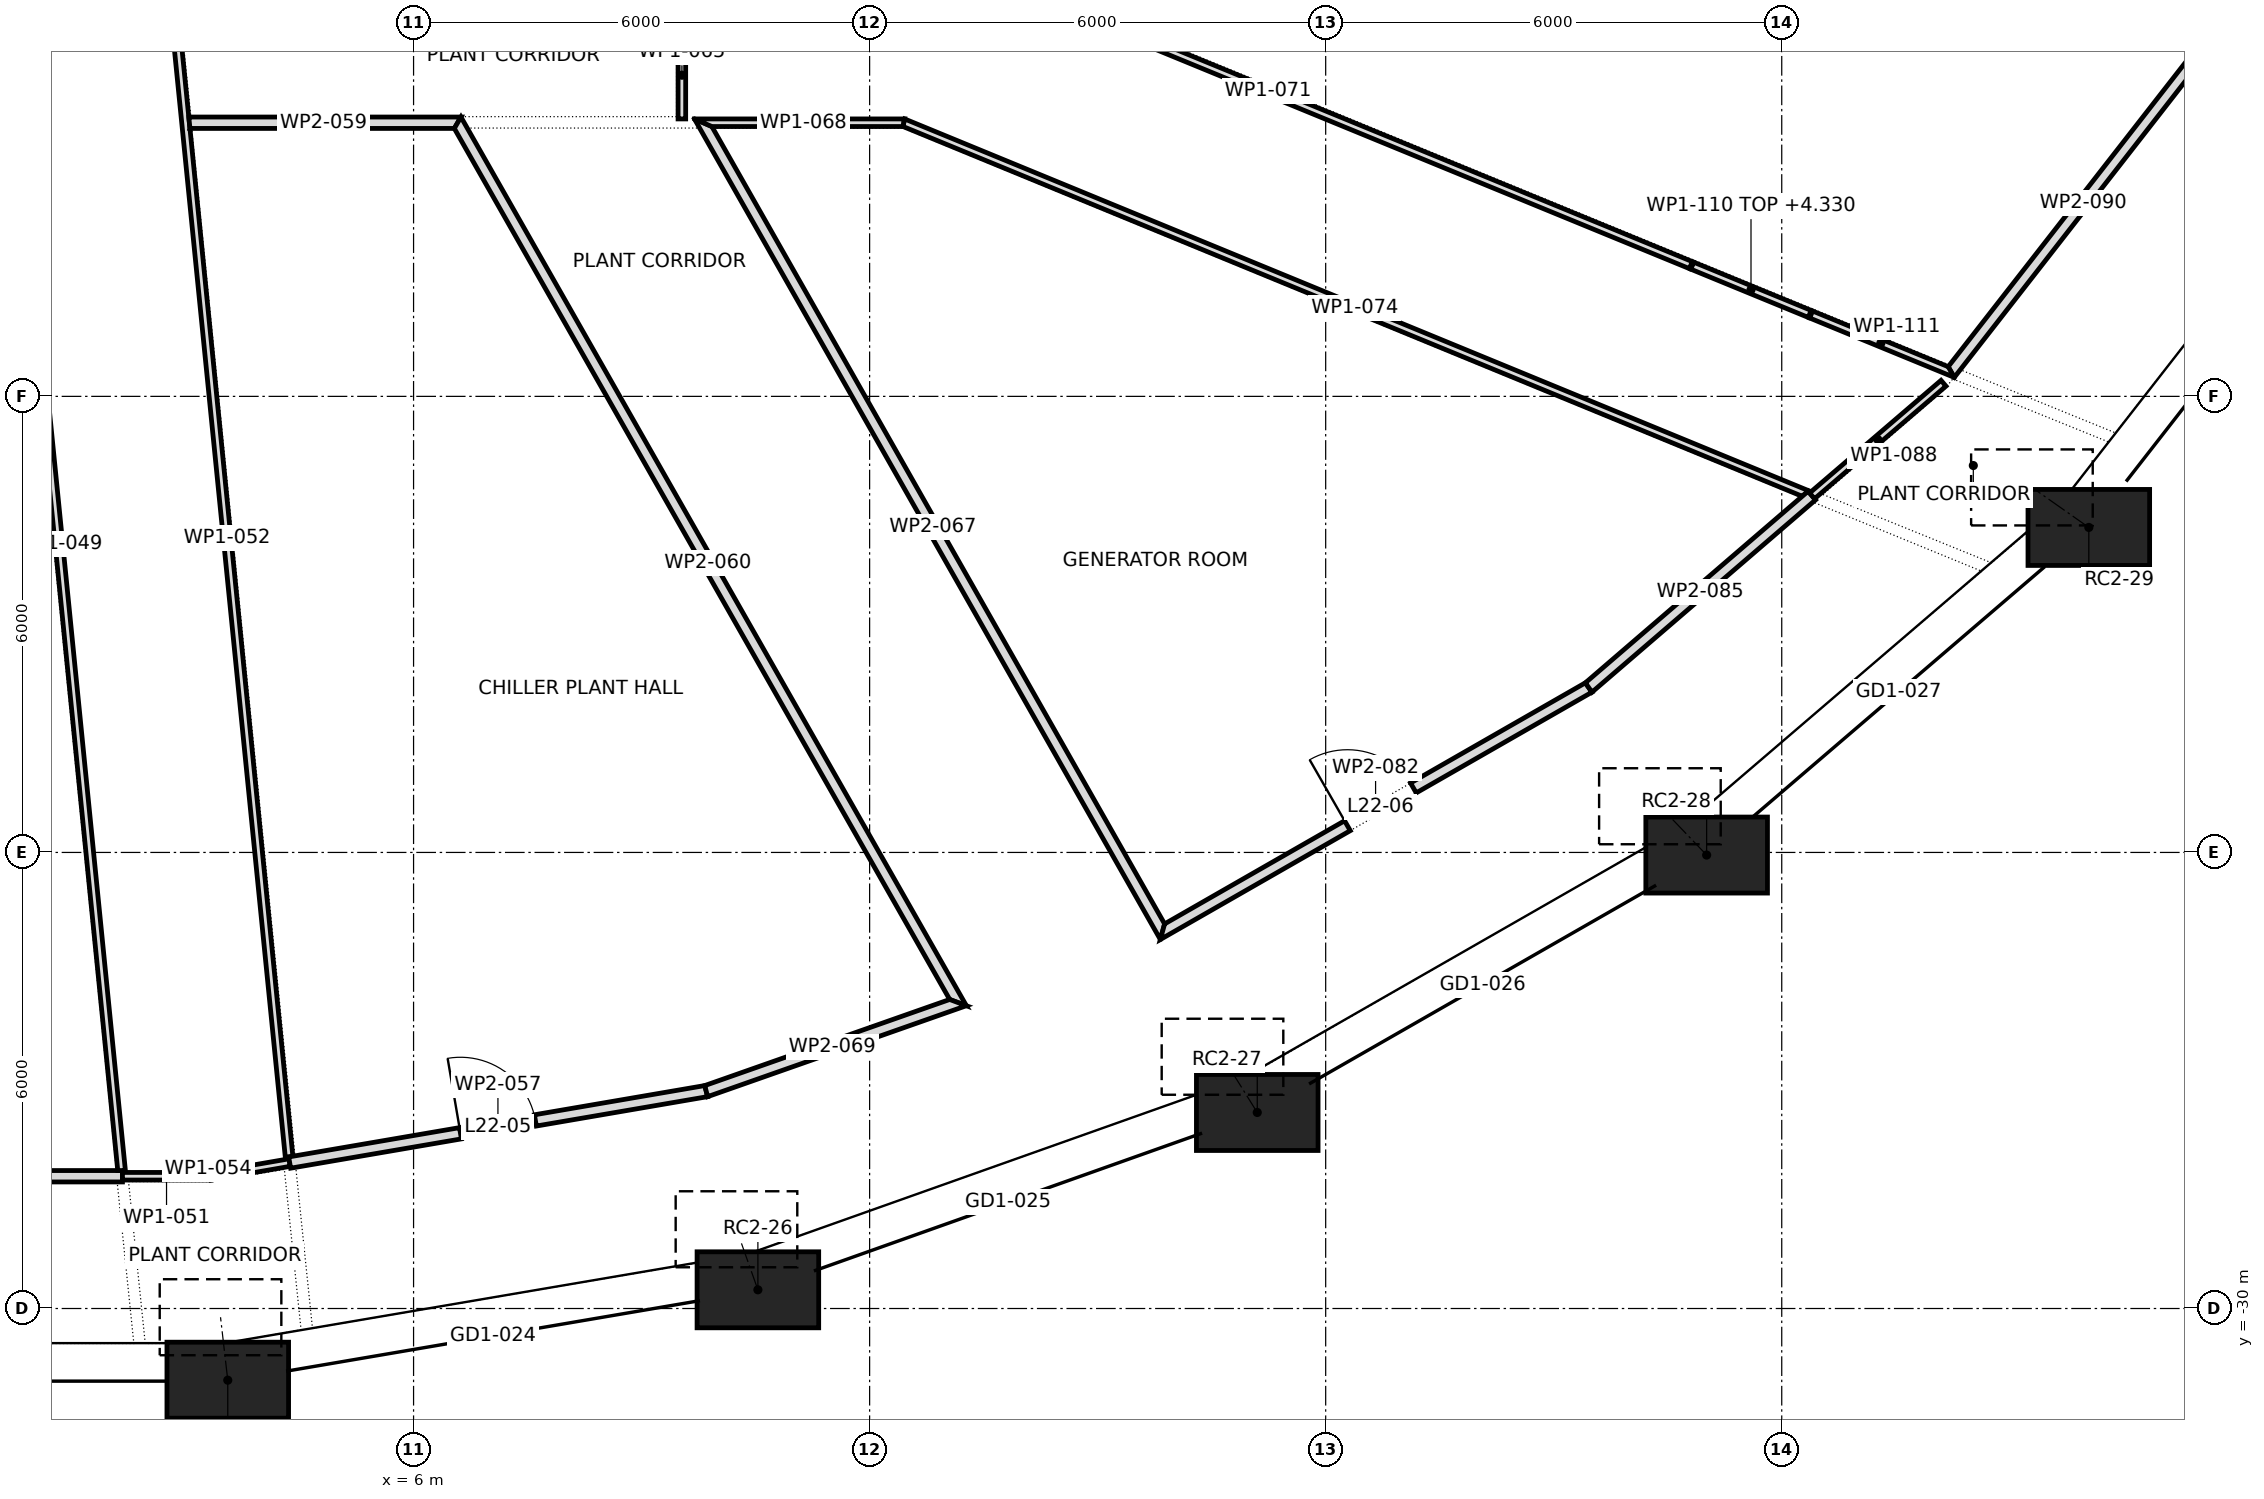
"""IFC4 building model, lengths in metres.
Left out: names, types, materials, properties, quantities, classifications, styles, units other than length and angle.
Written with IfcOpenShell. Run it as: python <this file> out.ifc"""

import sys

from ifc_helpers import new_model, si_unit, direction, frame, frame_2d, origin, origin_2d, place, context, subcontext, project, spatial, polyline, rectangle, outline, extrude, element, fill, save


model = new_model("IFC4")
c1 = context("Model", 3, precision=1e-05, world=origin(), true_north=direction((0.0, 1.0)))
c2 = subcontext(c1, "Body", "Model", "MODEL_VIEW")
j1 = project(units=[si_unit("LENGTHUNIT", "METRE"), si_unit("PLANEANGLEUNIT", "RADIAN")], contexts=[c1])
p1 = place(None, origin())
s1 = spatial("IfcSite", under=j1, at=p1, CompositionType="ELEMENT")
p2 = place(p1, origin())
s2 = spatial("IfcBuilding", under=s1, at=p2, CompositionType="ELEMENT")
p3 = place(p2, frame((0.0, 0.0, 99.1)))
s3 = spatial("IfcBuildingStorey", under=s2, at=p3, CompositionType="ELEMENT", Elevation=99.1)
p4 = place(p3, frame((3.556, -30.943, 0.078), z_axis=(-0.017932806139, 0.15601541341, 0.98759182117), x_axis=(-0.993458851833, -0.114190672624, 0.0)))
e1 = element("IfcColumn", 1, at=p4, inside=s3, PredefinedType="COLUMN", context=c2, shape_type="SweptSolid", body=[
    extrude(rectangle(XDim=1.6, YDim=1.0, at=origin_2d()), origin(), (0.0, 0.0, 1.0), 5.31),
])
p5 = place(p3, frame((10.53, -29.754, 0.079), z_axis=(-0.053064720362, 0.149997502446, 0.987261305184), x_axis=(-0.942744642547, -0.333515425352, 0.0)))
e2 = element("IfcColumn", 2, at=p5, inside=s3, PredefinedType="COLUMN", context=c2, shape_type="SweptSolid", body=[
    extrude(rectangle(XDim=1.6, YDim=1.0, at=origin_2d()), origin(), (0.0, 0.0, 1.0), 5.309),
])
p6 = place(p3, frame((17.1, -27.421, 0.081), z_axis=(-0.08609317292, 0.138107798226, 0.986668232815), x_axis=(-0.848616882571, -0.529007926798, 0.0)))
e3 = element("IfcColumn", 3, at=p6, inside=s3, PredefinedType="COLUMN", context=c2, shape_type="SweptSolid", body=[
    extrude(rectangle(XDim=1.6, YDim=1.0, at=origin_2d()), origin(), (0.0, 0.0, 1.0), 5.309),
])
p7 = place(p3, frame((23.012, -24.034, 0.083), z_axis=(-0.115812481815, 0.12096379157, 0.985877898213), x_axis=(-0.722319686129, -0.691559304059, 0.0)))
e4 = element("IfcColumn", 4, at=p7, inside=s3, PredefinedType="COLUMN", context=c2, shape_type="SweptSolid", body=[
    extrude(rectangle(XDim=1.6, YDim=1.0, at=origin_2d()), origin(), (0.0, 0.0, 1.0), 5.308),
])
p8 = place(p3, frame((28.04, -19.724, 0.086), z_axis=(-0.140981797412, 0.099170230088, 0.985032688931), x_axis=(-0.575341361803, -0.817913392358, 0.0)))
e5 = element("IfcColumn", 5, at=p8, inside=s3, PredefinedType="COLUMN", context=c2, shape_type="SweptSolid", body=[
    extrude(rectangle(XDim=1.6, YDim=1.0, at=origin_2d()), origin(), (0.0, 0.0, 1.0), 5.308),
])
p9 = place(p3, frame((-3.336, -28.26, 0.0), z_axis=(0.0, 0.0, 1.0), x_axis=(1.0, 0.0, 0.0)))
e6 = element("IfcWall", 6, at=p9, inside=s3, PredefinedType="PARTITIONING", context=c2, shape_type="SweptSolid", body=[
    extrude(outline(polyline([(5.506, 0.075), (3.675, 0.075), (1.844, 0.075), (0.013, 0.075), (0.0, -0.075), (1.835, -0.075), (3.671, -0.075), (5.506, -0.075), (5.506, 0.075)])), origin(), (0.0, 0.0, 1.0), 5.1),
])
p10 = place(p3, frame((0.51, -11.7, 0.0), z_axis=(0.0, 0.0, 1.0), x_axis=(0.09951245757, -0.995036316316, 0.0)))
e7 = element("IfcWall", 7, at=p10, inside=s3, PredefinedType="PARTITIONING", context=c2, shape_type="SweptSolid", body=[
    extrude(outline(polyline([(0.0, -0.05), (1.317, -0.05), (2.633, -0.05), (2.633, -0.05), (2.636, -0.05), (4.625, -0.05), (6.615, -0.05), (8.604, -0.05), (10.594, -0.05), (12.583, -0.05), (14.573, -0.05), (16.562, -0.05), (16.568, 0.011), (16.593, 0.009), (16.597, 0.045), (16.597, 0.05), (14.753, 0.05), (12.909, 0.05), (11.065, 0.05), (9.22, 0.05), (7.376, 0.05), (5.532, 0.05), (3.688, 0.05), (1.844, 0.05), (0.0, 0.05), (0.0, -0.05)])), origin(), (0.0, 0.0, 1.0), 5.1),
])
p11 = place(p3, frame((2.17, -28.26, 0.0), z_axis=(0.0, 0.0, 1.0), x_axis=(1.0, 0.0, 0.0)))
e8 = element("IfcWall", 8, at=p11, inside=s3, PredefinedType="PARTITIONING", context=c2, shape_type="SweptSolid", body=[
    extrude(outline(polyline([(1.164, -0.05), (1.164, -0.049), (1.156, 0.05), (0.0, 0.05), (0.0, -0.05), (1.164, -0.05)])), origin(), (0.0, 0.0, 1.0), 5.1),
])
p12 = place(p3, frame((2.73, -11.7, 0.0), z_axis=(0.0, 0.0, 1.0), x_axis=(0.099620052523, -0.995025549991, 0.0)))
e9 = element("IfcWall", 9, at=p12, inside=s3, PredefinedType="PARTITIONING", context=c2, shape_type="SweptSolid", body=[
    extrude(outline(polyline([(16.415, -0.05), (16.415, -0.042), (16.412, -0.003), (16.415, -0.003), (16.415, -0.003), (16.387, -0.005), (16.383, 0.05), (14.442, 0.05), (12.5, 0.05), (10.559, 0.05), (8.618, 0.05), (6.677, 0.05), (4.735, 0.05), (2.794, 0.05), (2.794, 0.05), (2.788, 0.05), (1.394, 0.05), (0.0, 0.05), (0.0, -0.05), (1.824, -0.05), (3.648, -0.05), (5.472, -0.05), (7.295, -0.05), (9.119, -0.05), (10.943, -0.05), (12.767, -0.05), (14.591, -0.05), (16.415, -0.05)])), origin(), (0.0, 0.0, 1.0), 5.1),
])
p13 = place(p3, frame((3.326, -28.261, 0.0), z_axis=(0.0, 0.0, 1.0), x_axis=(0.985366876911, 0.170446818353, 0.0)))
e10 = element("IfcWall", 10, at=p13, inside=s3, PredefinedType="PARTITIONING", context=c2, shape_type="SweptSolid", body=[
    extrude(outline(polyline([(1.06, 0.05), (0.009, 0.05), (0.0, -0.05), (1.06, -0.05), (1.06, 0.05)])), origin(), (0.0, 0.0, 1.0), 5.1),
])
p14 = place(p3, frame((4.37, -28.08, 0.0), z_axis=(0.0, 0.0, 1.0), x_axis=(0.985601586491, 0.169084336074, 0.0)))
e11 = element("IfcWall", 11, at=p14, inside=s3, PredefinedType="PARTITIONING", context=c2, shape_type="SweptSolid", body=[
    extrude(outline(polyline([(5.566, -0.075), (5.566, -0.074), (5.554, 0.075), (3.702, 0.075), (1.851, 0.075), (0.0, 0.075), (0.0, -0.075), (1.855, -0.075), (3.711, -0.075), (5.566, -0.075)])), origin(), (0.0, 0.0, 1.0), 5.1),
])
p15 = place(p14, frame((2.28, 0.0, 0.0)))
e12 = element("IfcOpeningElement", 12, at=p15, cuts=e11, PredefinedType="OPENING", context=c2, shape_type="SweptSolid", body=[
    extrude(rectangle(XDim=1.0, YDim=2.1, at=frame_2d((0.5, 1.05))), frame((0.0, 0.087, 0.0), z_axis=(0.0, -1.0, 0.0), x_axis=(1.0, 0.0, 0.0)), (0.0, 0.0, 1.0), 0.174),
])
p16 = place(p3, frame((6.624, -14.4, 0.0), z_axis=(0.0, 0.0, 1.0), x_axis=(-1.0, 0.0, 0.0)))
e13 = element("IfcWall", 13, at=p16, inside=s3, PredefinedType="PARTITIONING", context=c2, shape_type="SweptSolid", body=[
    extrude(outline(polyline([(3.58, -0.075), (3.58, -0.071), (3.565, 0.075), (1.826, 0.075), (0.087, 0.075), (0.043, 0.0), (0.0, -0.075), (0.0, -0.075), (1.79, -0.075), (3.58, -0.075)])), origin(), (0.0, 0.0, 1.0), 5.1),
])
p17 = place(p3, frame((6.558, -14.362, 0.0), z_axis=(0.0, 0.0, 1.0), x_axis=(0.494364889709, -0.869254482774, 0.0)))
e14 = element("IfcWall", 14, at=p17, inside=s3, PredefinedType="PARTITIONING", context=c2, shape_type="SweptSolid", body=[
    extrude(outline(polyline([(0.087, -0.075), (1.971, -0.075), (3.854, -0.075), (5.737, -0.075), (7.621, -0.075), (9.504, -0.075), (11.387, -0.075), (13.271, -0.075), (13.45, 0.075), (11.529, 0.075), (9.607, 0.075), (7.686, 0.075), (5.764, 0.075), (3.843, 0.075), (1.922, 0.075), (0.0, 0.075), (0.087, -0.075)])), origin(), (0.0, 0.0, 1.0), 5.1),
])
p18 = place(p3, frame((9.53, -13.167, 0.0), z_axis=(0.0, 0.0, 1.0), x_axis=(0.0, -1.0, 0.0)))
e15 = element("IfcWall", 15, at=p18, inside=s3, PredefinedType="PARTITIONING", context=c2, shape_type="SweptSolid", body=[
    extrude(outline(polyline([(0.0, 0.05), (0.0, 0.05), (0.067, -0.05), (1.184, -0.05), (1.184, 0.05), (0.0, 0.05)])), origin(), (0.0, 0.0, 1.0), 5.1),
])
p19 = place(p3, frame((9.76, -14.313, 0.0), z_axis=(0.0, 0.0, 1.0), x_axis=(0.493758679804, -0.869598968558, 0.0)))
e16 = element("IfcWall", 16, at=p19, inside=s3, PredefinedType="PARTITIONING", context=c2, shape_type="SweptSolid", body=[
    extrude(outline(polyline([(0.0, -0.075), (1.773, -0.075), (3.547, -0.075), (5.32, -0.075), (7.094, -0.075), (8.867, -0.075), (10.641, -0.075), (12.414, -0.075), (12.264, 0.075), (10.54, 0.075), (8.817, 0.075), (7.094, 0.075), (5.37, 0.075), (3.647, 0.075), (1.923, 0.075), (0.2, 0.075), (0.0, -0.075), (0.0, -0.075)])), origin(), (0.0, 0.0, 1.0), 5.1),
])
p20 = place(p3, frame((9.695, -14.4, 0.0), z_axis=(0.0, 0.0, 1.0), x_axis=(1.0, 0.0, 0.0)))
e17 = element("IfcWall", 17, at=p20, inside=s3, PredefinedType="PARTITIONING", context=c2, shape_type="SweptSolid", body=[
    extrude(outline(polyline([(0.229, -0.05), (1.487, -0.05), (2.745, -0.05), (2.765, 0.05), (1.382, 0.05), (0.0, 0.05), (0.0, 0.05), (0.229, -0.05)])), origin(), (0.0, 0.0, 1.0), 5.1),
])
p21 = place(p3, frame((9.844, -27.142, 0.0), z_axis=(0.0, 0.0, 1.0), x_axis=(0.943408080156, 0.331634127159, 0.0)))
e18 = element("IfcWall", 18, at=p21, inside=s3, PredefinedType="PARTITIONING", context=c2, shape_type="SweptSolid", body=[
    extrude(outline(polyline([(0.0, -0.075), (1.804, -0.075), (3.608, -0.075), (3.428, 0.075), (1.72, 0.075), (0.013, 0.075), (0.0, -0.075)])), origin(), (0.0, 0.0, 1.0), 5.1),
])
p22 = place(p3, frame((11.67, -11.7, 0.0), z_axis=(0.0, 0.0, 1.0), x_axis=(0.925020199912, -0.379917925025, 0.0)))
e19 = element("IfcWall", 19, at=p22, inside=s3, PredefinedType="PARTITIONING", context=c2, shape_type="SweptSolid", body=[
    extrude(outline(polyline([(0.0, 0.05), (0.0, -0.05), (1.721, -0.05), (3.442, -0.05), (5.163, -0.05), (6.884, -0.05), (8.605, -0.05), (10.326, -0.05), (12.047, -0.05), (12.047, 0.05), (10.326, 0.05), (8.605, 0.05), (6.884, 0.05), (5.163, 0.05), (3.442, 0.05), (1.721, 0.05), (0.0, 0.05)])), origin(), (0.0, 0.0, 1.0), 5.1),
])
p23 = place(p3, frame((12.441, -14.396, 0.0), z_axis=(0.0, 0.0, 1.0), x_axis=(0.924853269873, -0.380324110733, 0.0)))
e20 = element("IfcWall", 20, at=p23, inside=s3, PredefinedType="PARTITIONING", context=c2, shape_type="SweptSolid", body=[
    extrude(outline(polyline([(0.02, -0.05), (1.847, -0.05), (3.674, -0.05), (5.501, -0.05), (7.329, -0.05), (9.156, -0.05), (10.983, -0.05), (12.81, -0.05), (12.856, 0.041), (12.895, 0.021), (12.895, 0.037), (12.89, 0.04), (12.895, 0.049), (12.895, 0.05), (11.053, 0.05), (9.211, 0.05), (7.369, 0.05), (5.526, 0.05), (3.684, 0.05), (1.842, 0.05), (0.0, 0.05), (0.0, 0.05), (0.01, 0.0), (0.02, -0.05)])), origin(), (0.0, 0.0, 1.0), 5.1),
])
p24 = place(p3, frame((15.788, -25.08, 0.0), z_axis=(0.0, 0.0, 1.0), x_axis=(0.867670967067, 0.497138907055, 0.0)))
e21 = element("IfcWall", 21, at=p24, inside=s3, PredefinedType="PARTITIONING", context=c2, shape_type="SweptSolid", body=[
    extrude(outline(polyline([(0.0, -0.075), (1.636, -0.075), (3.272, -0.075), (4.908, -0.075), (6.545, -0.075), (6.53, 0.075), (4.936, 0.075), (3.341, 0.075), (1.746, 0.075), (0.151, 0.075), (0.0, -0.075)])), origin(), (0.0, 0.0, 1.0), 5.1),
])
p25 = place(p24, frame((2.88, 0.0, 0.0)))
e22 = element("IfcOpeningElement", 22, at=p25, cuts=e21, PredefinedType="OPENING", context=c2, shape_type="SweptSolid", body=[
    extrude(rectangle(XDim=1.0, YDim=2.1, at=frame_2d((0.5, 1.05))), frame((0.0, 0.087, 0.0), z_axis=(0.0, -1.0, 0.0), x_axis=(1.0, 0.0, 0.0)), (0.0, 0.0, 1.0), 0.174),
])
p26 = place(p3, frame((21.455, -21.835, 0.0), z_axis=(0.0, 0.0, 1.0), x_axis=(0.758167150763, 0.652060251437, 0.0)))
e23 = element("IfcWall", 23, at=p26, inside=s3, PredefinedType="PARTITIONING", context=c2, shape_type="SweptSolid", body=[
    extrude(outline(polyline([(3.879, 0.075), (1.947, 0.075), (0.014, 0.075), (0.0, -0.075), (1.94, -0.075), (3.879, -0.075), (3.879, 0.075)])), origin(), (0.0, 0.0, 1.0), 5.1),
])
p27 = place(p3, frame((24.399, -19.309, 0.0), z_axis=(0.0, 0.0, 1.0), x_axis=(0.759233893013, 0.650817866765, 0.0)))
e24 = element("IfcWall", 24, at=p27, inside=s3, PredefinedType="PARTITIONING", context=c2, shape_type="SweptSolid", body=[
    extrude(outline(polyline([(2.277, 0.05), (0.025, 0.05), (0.0, 0.038), (0.0, -0.05), (2.277, -0.05), (2.277, 0.05)])), origin(), (0.0, 0.0, 1.0), 5.1),
])
p28 = place(p3, frame((26.211, -17.704, 0.0), z_axis=(0.0, 0.0, 1.0), x_axis=(0.614915849889, 0.788592732375, 0.0)))
e25 = element("IfcWall", 25, at=p28, inside=s3, PredefinedType="PARTITIONING", context=c2, shape_type="SweptSolid", body=[
    extrude(outline(polyline([(0.0, -0.075), (1.894, -0.075), (3.788, -0.075), (5.682, -0.075), (5.666, 0.075), (3.798, 0.075), (1.93, 0.075), (0.062, 0.075), (0.0, -0.075)])), origin(), (0.0, 0.0, 1.0), 5.1),
])
p29 = place(p3, frame((22.814, -16.277, 0.0), z_axis=(0.0, 0.0, 1.0), x_axis=(0.925000784705, -0.37996519353, 0.0)))
e26 = element("IfcWall", 26, at=p29, inside=s3, PredefinedType="PARTITIONING", context=c2, shape_type="SweptSolid", body=[
    extrude(outline(polyline([(0.0, 0.05), (0.0, -0.05), (1.69, -0.05), (1.69, 0.05), (0.0, 0.05)])), origin(), (0.0, 0.0, 1.0), 4.33),
])
p30 = place(p3, frame((24.377, -16.919, 0.0), z_axis=(0.0, 0.0, 1.0), x_axis=(0.925015370033, -0.37992968455, 0.0)))
e27 = element("IfcWall", 27, at=p30, inside=s3, PredefinedType="PARTITIONING", context=c2, shape_type="SweptSolid", body=[
    extrude(outline(polyline([(2.067, -0.05), (2.067, -0.05), (1.939, 0.05), (0.0, 0.05), (0.0, -0.05), (2.067, -0.05)])), origin(), (0.0, 0.0, 1.0), 5.1),
])
p31 = place(p15, origin())
e28 = element("IfcDoor", 28, at=p31, inside=s3, OperationType="SINGLE_SWING_RIGHT", PredefinedType="DOOR", context=c2, shape_type="SweptSolid", body=[
    extrude(rectangle(XDim=1.0, YDim=2.1, at=frame_2d((0.5, 1.05))), frame((0.0, 0.025, 0.0), z_axis=(0.0, -1.0, 0.0), x_axis=(1.0, 0.0, 0.0)), (0.0, 0.0, 1.0), 0.05),
])
fill(e12, e28)
p32 = place(p25, origin())
e29 = element("IfcDoor", 29, at=p32, inside=s3, OperationType="SINGLE_SWING_RIGHT", PredefinedType="DOOR", context=c2, shape_type="SweptSolid", body=[
    extrude(rectangle(XDim=1.0, YDim=2.1, at=frame_2d((0.5, 1.05))), frame((0.0, 0.025, 0.0), z_axis=(0.0, -1.0, 0.0), x_axis=(1.0, 0.0, 0.0)), (0.0, 0.0, 1.0), 0.05),
])
fill(e22, e29)
save(model, sys.argv[1])
